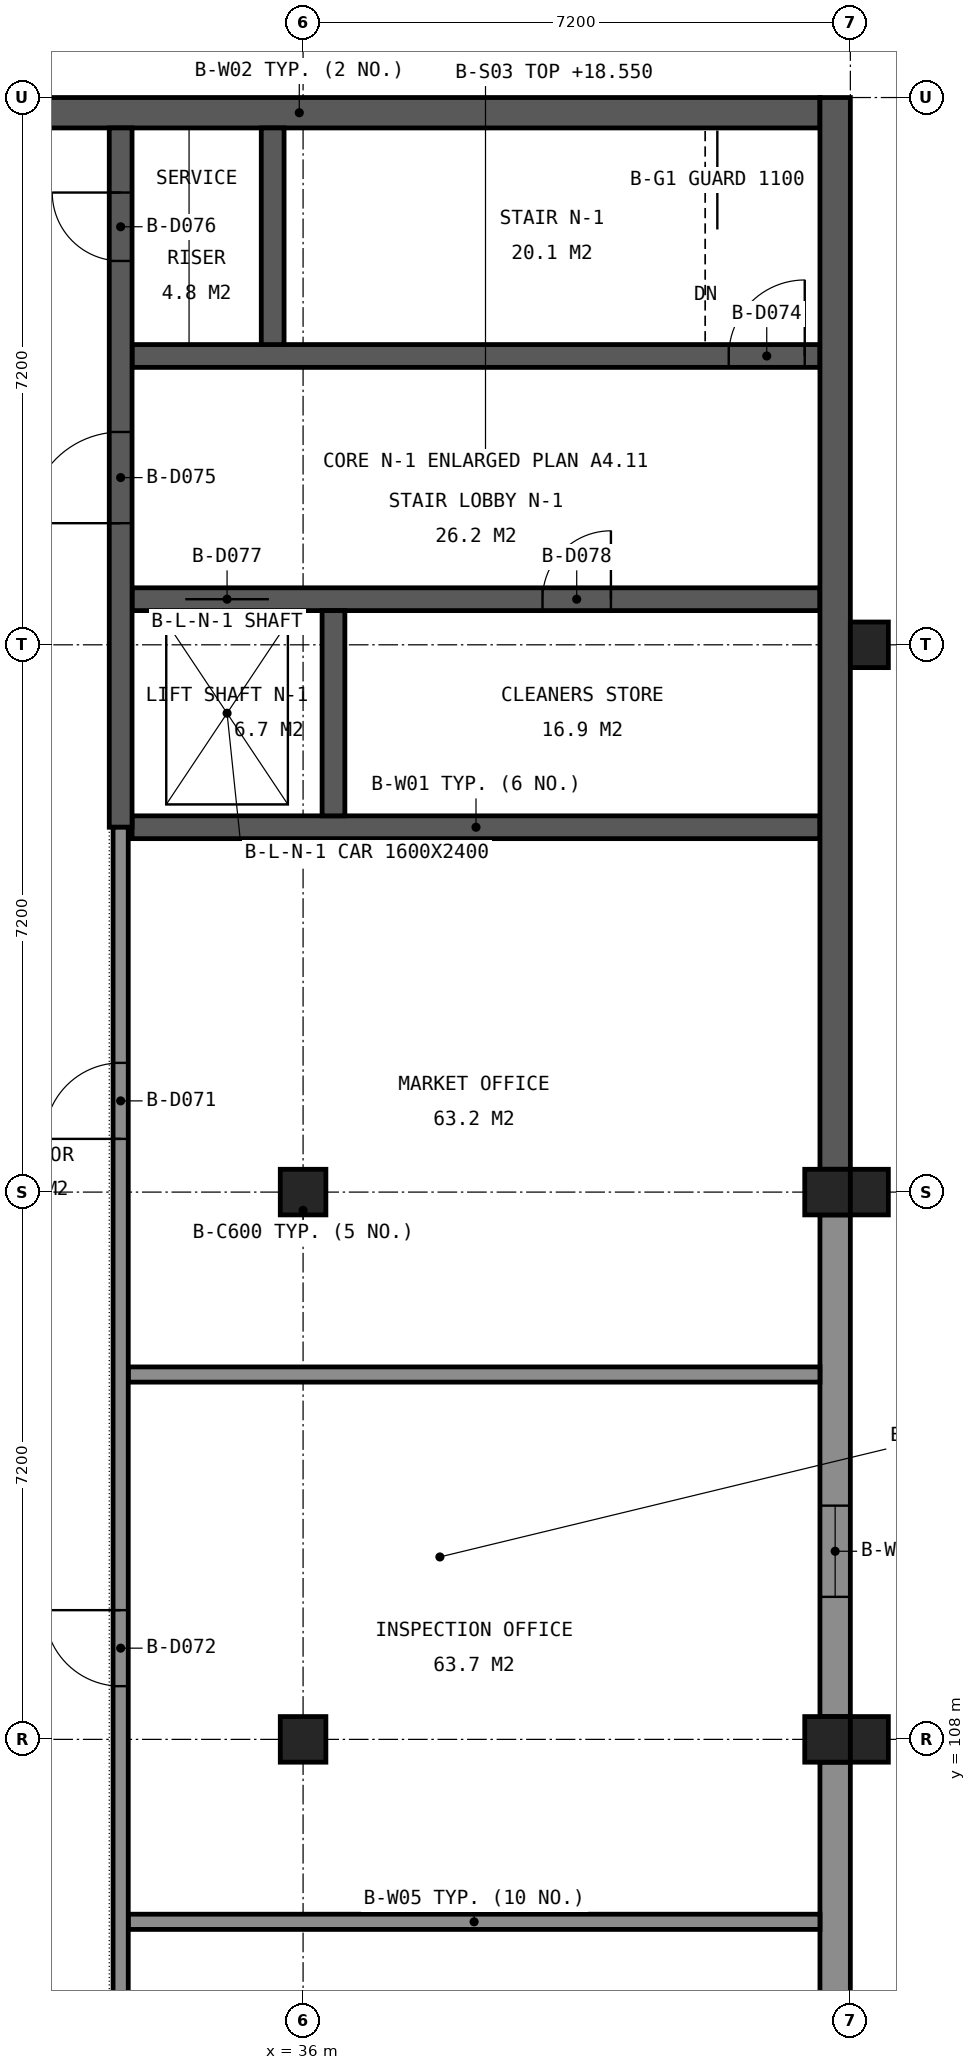
"""IFC4 building model, lengths in metres.
Left out: names, types, materials, properties, quantities, classifications, styles, units other than length and angle.
Written with IfcOpenShell. Run it as: python <this file> out.ifc"""

import sys

from ifc_helpers import new_model, si_unit, direction, frame, frame_2d, origin, origin_2d, place, context, subcontext, project, spatial, rectangle, extrude, element, fill, save


model = new_model("IFC4")
c1 = context("Model", 3, precision=1e-05, world=origin(), true_north=direction((0.0, 1.0)))
c2 = subcontext(c1, "Body", "Model", "MODEL_VIEW")
j1 = project(units=[si_unit("LENGTHUNIT", "METRE"), si_unit("PLANEANGLEUNIT", "RADIAN")], contexts=[c1])
p1 = place(None, origin())
s1 = spatial("IfcSite", under=j1, at=p1, CompositionType="ELEMENT")
p2 = place(p1, origin())
s2 = spatial("IfcBuilding", under=s1, at=p2, CompositionType="ELEMENT")
p3 = place(p2, frame((0.0, 0.0, 14.4)))
s3 = spatial("IfcBuildingStorey", under=s2, at=p3, CompositionType="ELEMENT", Elevation=14.4)
for number, where, z_axis, x_axis in (
    (1, (36.0, 115.2, 0.0), (0.0, 0.0, 1.0), (1.0, 0.0, 0.0)),
    (2, (36.0, 108.0, 0.0), (0.0, 0.0, 1.0), (1.0, 0.0, 0.0)),
):
    element("IfcColumn", number, at=place(p3, frame(where, z_axis=z_axis, x_axis=x_axis)), inside=s3, PredefinedType="COLUMN", context=c2, shape_type="SweptSolid", body=[
        extrude(rectangle(XDim=0.6, YDim=0.6, at=origin_2d()), origin(), (0.0, 0.0, 1.0), 4.713),
    ])
for number, where, z_axis, x_axis in (
    (3, (42.9, 115.2, 0.0), (0.0, 0.0, 1.0), (1.0, 0.0, 0.0)),
    (4, (42.9, 108.0, 0.0), (0.0, 0.0, 1.0), (1.0, 0.0, 0.0)),
):
    element("IfcColumn", number, at=place(p3, frame(where, z_axis=z_axis, x_axis=x_axis)), inside=s3, PredefinedType="COLUMN", context=c2, shape_type="SweptSolid", body=[
        extrude(rectangle(XDim=0.6, YDim=0.6, at=origin_2d()), origin(), (0.0, 0.0, 1.0), 4.138),
    ])
p4 = place(p3, frame((33.75, 120.0, 0.0), z_axis=(0.0, 0.0, 1.0), x_axis=(1.0, 0.0, 0.0)))
e5 = element("IfcWall", 5, at=p4, inside=s3, PredefinedType="SHEAR", context=c2, shape_type="SweptSolid", body=[
    extrude(rectangle(XDim=9.05, YDim=0.3, at=frame_2d((4.525, 0.0))), origin(), (0.0, 0.0, 1.0), 3.9),
])
p5 = place(p3, frame((33.75, 123.0, 0.0), z_axis=(0.0, 0.0, 1.0), x_axis=(1.0, 0.0, 0.0)))
e6 = element("IfcWall", 6, at=p5, inside=s3, PredefinedType="SHEAR", context=c2, shape_type="SweptSolid", body=[
    extrude(rectangle(XDim=9.05, YDim=0.3, at=frame_2d((4.525, 0.0))), origin(), (0.0, 0.0, 1.0), 3.9),
])
p6 = place(p5, frame((0.7, 0.0, 0.0)))
e7 = element("IfcOpeningElement", 7, at=p6, cuts=e6, PredefinedType="OPENING", context=c2, shape_type="SweptSolid", body=[
    extrude(rectangle(XDim=1.1, YDim=2.1, at=frame_2d((0.55, 1.05))), frame((0.0, 0.16, 0.0), z_axis=(0.0, -1.0, 0.0), x_axis=(1.0, 0.0, 0.0)), (0.0, 0.0, 1.0), 0.32),
])
p7 = place(p5, frame((5.4, 0.0, 0.0)))
e8 = element("IfcOpeningElement", 8, at=p7, cuts=e6, PredefinedType="OPENING", context=c2, shape_type="SweptSolid", body=[
    extrude(rectangle(XDim=0.9, YDim=2.1, at=frame_2d((0.45, 1.05))), frame((0.0, 0.16, 0.0), z_axis=(0.0, -1.0, 0.0), x_axis=(1.0, 0.0, 0.0)), (0.0, 0.0, 1.0), 0.32),
])
p8 = place(p3, frame((33.75, 126.2, 0.0), z_axis=(0.0, 0.0, 1.0), x_axis=(1.0, 0.0, 0.0)))
e9 = element("IfcWall", 9, at=p8, inside=s3, PredefinedType="SHEAR", context=c2, shape_type="SweptSolid", body=[
    extrude(rectangle(XDim=9.05, YDim=0.3, at=frame_2d((4.525, 0.0))), origin(), (0.0, 0.0, 1.0), 3.9),
])
p9 = place(p8, frame((7.85, 0.0, 0.0)))
e10 = element("IfcOpeningElement", 10, at=p9, cuts=e9, PredefinedType="OPENING", context=c2, shape_type="SweptSolid", body=[
    extrude(rectangle(XDim=1.0, YDim=2.1, at=frame_2d((0.5, 1.05))), frame((0.0, 0.16, 0.0), z_axis=(0.0, -1.0, 0.0), x_axis=(1.0, 0.0, 0.0)), (0.0, 0.0, 1.0), 0.32),
])
p10 = place(p3, frame((29.1, 129.4, 0.0), z_axis=(0.0, 0.0, 1.0), x_axis=(1.0, 0.0, 0.0)))
e11 = element("IfcWall", 11, at=p10, inside=s3, PredefinedType="SHEAR", context=c2, shape_type="SweptSolid", body=[
    extrude(rectangle(XDim=13.7, YDim=0.4, at=frame_2d((6.85, 0.0))), origin(), (0.0, 0.0, 1.0), 3.9),
])
p11 = place(p3, frame((33.6, 120.0, 0.0), z_axis=(0.0, 0.0, 1.0), x_axis=(0.0, 1.0, 0.0)))
e12 = element("IfcWall", 12, at=p11, inside=s3, PredefinedType="SHEAR", context=c2, shape_type="SweptSolid", body=[
    extrude(rectangle(XDim=9.2, YDim=0.3, at=frame_2d((4.6, 0.0))), origin(), (0.0, 0.0, 1.0), 3.9),
])
p12 = place(p11, frame((4.0, 0.0, 0.0)))
e13 = element("IfcOpeningElement", 13, at=p12, cuts=e12, PredefinedType="OPENING", context=c2, shape_type="SweptSolid", body=[
    extrude(rectangle(XDim=1.2, YDim=2.1, at=frame_2d((0.6, 1.05))), frame((0.0, 0.16, 0.0), z_axis=(0.0, -1.0, 0.0), x_axis=(1.0, 0.0, 0.0)), (0.0, 0.0, 1.0), 0.32),
])
p13 = place(p11, frame((7.45, 0.0, 0.0)))
e14 = element("IfcOpeningElement", 14, at=p13, cuts=e12, PredefinedType="OPENING", context=c2, shape_type="SweptSolid", body=[
    extrude(rectangle(XDim=0.9, YDim=2.1, at=frame_2d((0.45, 1.05))), frame((0.0, 0.16, 0.0), z_axis=(0.0, -1.0, 0.0), x_axis=(1.0, 0.0, 0.0)), (0.0, 0.0, 1.0), 0.32),
])
p14 = place(p3, frame((35.6, 126.35, 0.0), z_axis=(0.0, 0.0, 1.0), x_axis=(0.0, 1.0, 0.0)))
e15 = element("IfcWall", 15, at=p14, inside=s3, PredefinedType="SHEAR", context=c2, shape_type="SweptSolid", body=[
    extrude(rectangle(XDim=2.85, YDim=0.3, at=frame_2d((1.425, 0.0))), origin(), (0.0, 0.0, 1.0), 3.9),
])
p15 = place(p3, frame((36.4, 120.15, 0.0), z_axis=(0.0, 0.0, 1.0), x_axis=(0.0, 1.0, 0.0)))
e16 = element("IfcWall", 16, at=p15, inside=s3, PredefinedType="SHEAR", context=c2, shape_type="SweptSolid", body=[
    extrude(rectangle(XDim=2.7, YDim=0.3, at=frame_2d((1.35, 0.0))), origin(), (0.0, 0.0, 1.0), 3.9),
])
p16 = place(p3, frame((43.0, 115.5, 0.0), z_axis=(0.0, 0.0, 1.0), x_axis=(0.0, 1.0, 0.0)))
e17 = element("IfcWall", 17, at=p16, inside=s3, PredefinedType="SHEAR", context=c2, shape_type="SweptSolid", body=[
    extrude(rectangle(XDim=14.1, YDim=0.4, at=frame_2d((7.05, 0.0))), origin(), (0.0, 0.0, 1.0), 3.9),
])
p17 = place(p3, frame((43.0, 101.1, 0.0), z_axis=(0.0, 0.0, 1.0), x_axis=(0.0, 1.0, 0.0)))
e18 = element("IfcWall", 18, at=p17, inside=s3, PredefinedType="SOLIDWALL", context=c2, shape_type="SweptSolid", body=[
    extrude(rectangle(XDim=6.6, YDim=0.4, at=frame_2d((3.3, 0.0))), origin(), (0.0, 0.0, 1.0), 4.129),
])
p18 = place(p17, frame((1.575, 0.0, 1.6)))
e19 = element("IfcOpeningElement", 19, at=p18, cuts=e18, PredefinedType="OPENING", context=c2, shape_type="SweptSolid", body=[
    extrude(rectangle(XDim=1.2, YDim=1.2, at=frame_2d((0.6, 0.6))), frame((0.0, 0.21, 0.0), z_axis=(0.0, -1.0, 0.0), x_axis=(1.0, 0.0, 0.0)), (0.0, 0.0, 1.0), 0.42),
])
p19 = place(p3, frame((43.0, 108.3, 0.0), z_axis=(0.0, 0.0, 1.0), x_axis=(0.0, 1.0, 0.0)))
e20 = element("IfcWall", 20, at=p19, inside=s3, PredefinedType="SOLIDWALL", context=c2, shape_type="SweptSolid", body=[
    extrude(rectangle(XDim=6.6, YDim=0.4, at=frame_2d((3.3, 0.0))), origin(), (0.0, 0.0, 1.0), 4.129),
])
p20 = place(p19, frame((1.575, 0.0, 1.6)))
e21 = element("IfcOpeningElement", 21, at=p20, cuts=e20, PredefinedType="OPENING", context=c2, shape_type="SweptSolid", body=[
    extrude(rectangle(XDim=1.2, YDim=1.2, at=frame_2d((0.6, 0.6))), frame((0.0, 0.21, 0.0), z_axis=(0.0, -1.0, 0.0), x_axis=(1.0, 0.0, 0.0)), (0.0, 0.0, 1.0), 0.42),
])
for number, where, z_axis, x_axis in (
    (22, (43.45, 108.0, 0.0), (0.0, 0.0, 1.0), (1.0, 0.0, 0.0)),
    (23, (43.45, 115.2, 0.0), (0.0, 0.0, 1.0), (1.0, 0.0, 0.0)),
    (24, (43.45, 122.4, 0.0), (0.0, 0.0, 1.0), (1.0, 0.0, 0.0)),
):
    element("IfcColumn", number, at=place(p3, frame(where, z_axis=z_axis, x_axis=x_axis)), inside=s3, PredefinedType="COLUMN", context=c2, shape_type="SweptSolid", body=[
        extrude(rectangle(XDim=0.5, YDim=0.6, at=origin_2d()), origin(), (0.0, 0.0, 1.0), 3.8),
    ])
for number, where, z_axis, x_axis in (
    (25, (33.7, 105.6, 0.0), (0.0, 0.0, 1.0), (1.0, 0.0, 0.0)),
    (26, (33.7, 112.8, 0.0), (0.0, 0.0, 1.0), (1.0, 0.0, 0.0)),
):
    element("IfcWall", number, at=place(p3, frame(where, z_axis=z_axis, x_axis=x_axis)), inside=s3, PredefinedType="PARTITIONING", context=c2, shape_type="SweptSolid", body=[
        extrude(rectangle(XDim=9.1, YDim=0.2, at=frame_2d((4.55, 0.0))), origin(), (0.0, 0.0, 1.0), 4.0),
    ])
p21 = place(p3, frame((33.6, 96.0, 0.0), z_axis=(0.0, 0.0, 1.0), x_axis=(0.0, 1.0, 0.0)))
e27 = element("IfcWall", 27, at=p21, inside=s3, PredefinedType="PARTITIONING", context=c2, shape_type="SweptSolid", body=[
    extrude(rectangle(XDim=24.0, YDim=0.2, at=frame_2d((12.0, 0.0))), origin(), (0.0, 0.0, 1.0), 4.0),
])
p22 = place(p21, frame((19.9, 0.0, 0.0)))
e28 = element("IfcOpeningElement", 28, at=p22, cuts=e27, PredefinedType="OPENING", context=c2, shape_type="SweptSolid", body=[
    extrude(rectangle(XDim=1.0, YDim=2.1, at=frame_2d((0.5, 1.05))), frame((0.0, 0.11, 0.0), z_axis=(0.0, -1.0, 0.0), x_axis=(1.0, 0.0, 0.0)), (0.0, 0.0, 1.0), 0.22),
])
p23 = place(p21, frame((12.7, 0.0, 0.0)))
e29 = element("IfcOpeningElement", 29, at=p23, cuts=e27, PredefinedType="OPENING", context=c2, shape_type="SweptSolid", body=[
    extrude(rectangle(XDim=1.0, YDim=2.1, at=frame_2d((0.5, 1.05))), frame((0.0, 0.11, 0.0), z_axis=(0.0, -1.0, 0.0), x_axis=(1.0, 0.0, 0.0)), (0.0, 0.0, 1.0), 0.22),
])
p24 = place(p21, frame((4.3, 0.0, 0.0)))
e30 = element("IfcOpeningElement", 30, at=p24, cuts=e27, PredefinedType="OPENING", context=c2, shape_type="SweptSolid", body=[
    extrude(rectangle(XDim=1.0, YDim=2.1, at=frame_2d((0.5, 1.05))), frame((0.0, 0.11, 0.0), z_axis=(0.0, -1.0, 0.0), x_axis=(1.0, 0.0, 0.0)), (0.0, 0.0, 1.0), 0.22),
])
p25 = place(p20, origin())
e31 = element("IfcWindow", 31, at=p25, inside=s3, PartitioningType="SINGLE_PANEL", PredefinedType="WINDOW", context=c2, shape_type="SweptSolid", body=[
    extrude(rectangle(XDim=1.2, YDim=1.2, at=frame_2d((0.6, 0.6))), frame((0.0, 0.03, 0.0), z_axis=(0.0, -1.0, 0.0), x_axis=(1.0, 0.0, 0.0)), (0.0, 0.0, 1.0), 0.06),
])
fill(e21, e31)
p26 = place(p22, origin())
e32 = element("IfcDoor", 32, at=p26, inside=s3, OperationType="SINGLE_SWING_LEFT", PredefinedType="DOOR", context=c2, shape_type="SweptSolid", body=[
    extrude(rectangle(XDim=1.0, YDim=2.1, at=frame_2d((0.5, 1.05))), frame((0.0, 0.025, 0.0), z_axis=(0.0, -1.0, 0.0), x_axis=(1.0, 0.0, 0.0)), (0.0, 0.0, 1.0), 0.05),
])
fill(e28, e32)
p27 = place(p23, origin())
e33 = element("IfcDoor", 33, at=p27, inside=s3, OperationType="SINGLE_SWING_RIGHT", PredefinedType="DOOR", context=c2, shape_type="SweptSolid", body=[
    extrude(rectangle(XDim=1.0, YDim=2.1, at=frame_2d((0.5, 1.05))), frame((0.0, 0.025, 0.0), z_axis=(0.0, -1.0, 0.0), x_axis=(1.0, 0.0, 0.0)), (0.0, 0.0, 1.0), 0.05),
])
fill(e29, e33)
p28 = place(p9, origin())
e34 = element("IfcDoor", 34, at=p28, inside=s3, OperationType="SINGLE_SWING_RIGHT", PredefinedType="DOOR", context=c2, shape_type="SweptSolid", body=[
    extrude(rectangle(XDim=1.0, YDim=2.1, at=frame_2d((0.5, 1.05))), frame((0.0, 0.025, 0.0), z_axis=(0.0, -1.0, 0.0), x_axis=(1.0, 0.0, 0.0)), (0.0, 0.0, 1.0), 0.05),
])
fill(e10, e34)
p29 = place(p12, origin())
e35 = element("IfcDoor", 35, at=p29, inside=s3, OperationType="SINGLE_SWING_LEFT", PredefinedType="DOOR", context=c2, shape_type="SweptSolid", body=[
    extrude(rectangle(XDim=1.2, YDim=2.1, at=frame_2d((0.6, 1.05))), frame((0.0, 0.025, 0.0), z_axis=(0.0, -1.0, 0.0), x_axis=(1.0, 0.0, 0.0)), (0.0, 0.0, 1.0), 0.05),
])
fill(e13, e35)
p30 = place(p13, origin())
e36 = element("IfcDoor", 36, at=p30, inside=s3, OperationType="SINGLE_SWING_RIGHT", PredefinedType="DOOR", context=c2, shape_type="SweptSolid", body=[
    extrude(rectangle(XDim=0.9, YDim=2.1, at=frame_2d((0.45, 1.05))), frame((0.0, 0.025, 0.0), z_axis=(0.0, -1.0, 0.0), x_axis=(1.0, 0.0, 0.0)), (0.0, 0.0, 1.0), 0.05),
])
fill(e14, e36)
p31 = place(p6, origin())
e37 = element("IfcDoor", 37, at=p31, inside=s3, OperationType="SLIDING_TO_LEFT", PredefinedType="DOOR", context=c2, shape_type="SweptSolid", body=[
    extrude(rectangle(XDim=1.1, YDim=2.1, at=frame_2d((0.55, 1.05))), frame((0.0, 0.025, 0.0), z_axis=(0.0, -1.0, 0.0), x_axis=(1.0, 0.0, 0.0)), (0.0, 0.0, 1.0), 0.05),
])
fill(e7, e37)
p32 = place(p7, origin())
e38 = element("IfcDoor", 38, at=p32, inside=s3, OperationType="SINGLE_SWING_RIGHT", PredefinedType="DOOR", context=c2, shape_type="SweptSolid", body=[
    extrude(rectangle(XDim=0.9, YDim=2.1, at=frame_2d((0.45, 1.05))), frame((0.0, 0.025, 0.0), z_axis=(0.0, -1.0, 0.0), x_axis=(1.0, 0.0, 0.0)), (0.0, 0.0, 1.0), 0.05),
])
fill(e8, e38)
save(model, sys.argv[1])
